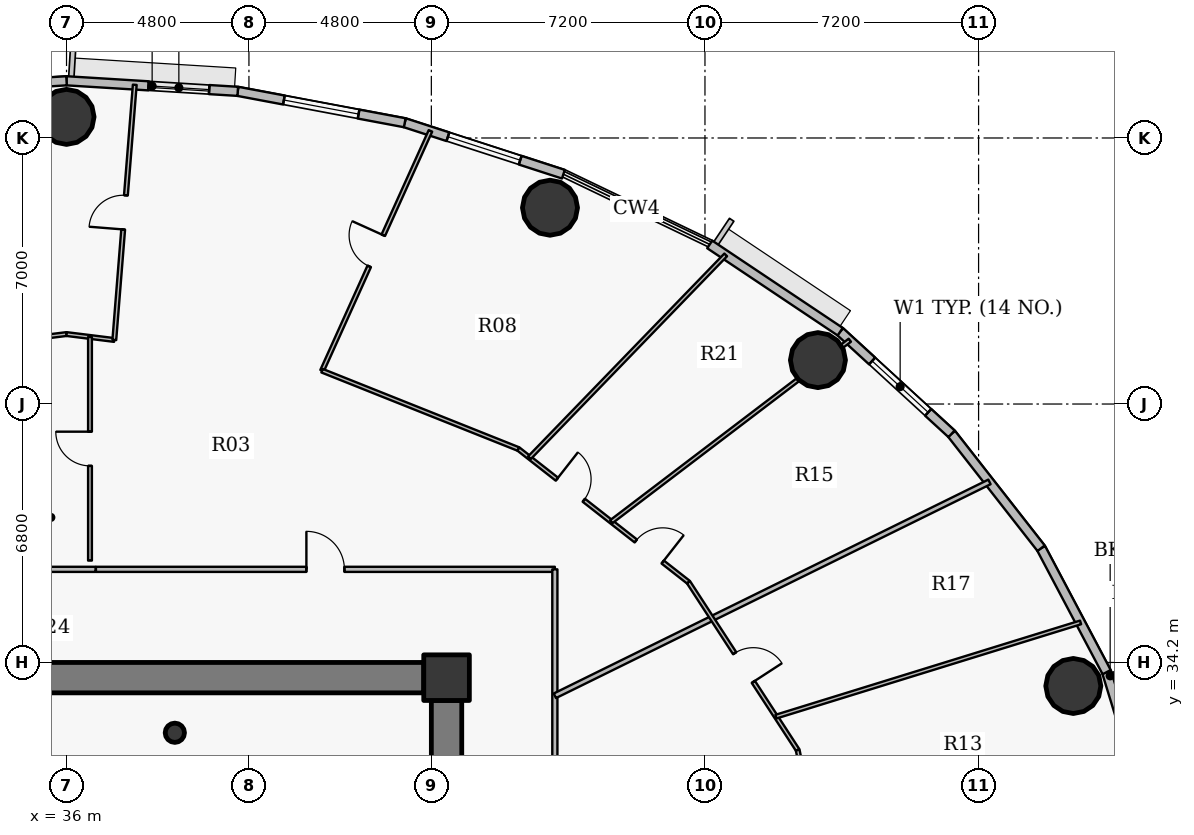
"""IFC4 building model, lengths in metres.
Left out: names, types, materials, properties, quantities, classifications, styles, units other than length and angle.
Written with IfcOpenShell. Run it as: python <this file> out.ifc"""

import sys

from ifc_helpers import new_model, si_unit, direction, frame, frame_2d, origin, origin_2d, place, context, subcontext, project, spatial, rectangle, hollow_circle, extrude, source, transform, mapped, element, fill, save


model = new_model("IFC4")
c1 = context("Model", 3, precision=1e-05, world=origin(), true_north=direction((0.0, 1.0)))
c2 = subcontext(c1, "Body", "Model", "MODEL_VIEW")
j1 = project(units=[si_unit("LENGTHUNIT", "METRE"), si_unit("PLANEANGLEUNIT", "RADIAN")], contexts=[c1])
p1 = place(None, origin())
s1 = spatial("IfcSite", under=j1, at=p1, CompositionType="ELEMENT")
p2 = place(p1, origin())
s2 = spatial("IfcBuilding", under=s1, at=p2, CompositionType="ELEMENT")
p3 = place(p2, frame((0.0, 0.0, 138.45)))
s3 = spatial("IfcBuildingStorey", under=s2, at=p3, CompositionType="ELEMENT", Elevation=138.45)
p4 = place(p3, frame((46.0, 33.8, 0.0), z_axis=(0.0, 0.0, 1.0), x_axis=(1.0, 0.0, 0.0)))
e1 = element("IfcColumn", 1, at=p4, inside=s3, PredefinedType="COLUMN", context=c2, shape_type="SweptSolid", body=[
    extrude(rectangle(XDim=1.2, YDim=1.2, at=origin_2d()), origin(), (0.0, 0.0, 1.0), 3.75),
])
p5 = place(p3, frame((38.85, 32.35, 0.0), z_axis=(0.0, 0.0, 1.0), x_axis=(1.0, 0.0, 0.0)))
e2 = element("IfcColumn", 2, at=p5, inside=s3, PredefinedType="COLUMN", context=c2, shape_type="SweptSolid", body=[
    extrude(hollow_circle(Radius=0.254, WallThickness=0.02, at=origin_2d()), origin(), (0.0, 0.0, 1.0), 3.75),
])
p6 = place(p3, frame((26.6, 33.8, 0.0), z_axis=(0.0, 0.0, 1.0), x_axis=(1.0, 0.0, 0.0)))
e3 = element("IfcWall", 3, at=p6, inside=s3, PredefinedType="SHEAR", context=c2, shape_type="SweptSolid", body=[
    extrude(rectangle(XDim=18.8, YDim=0.8, at=frame_2d((9.4, 0.0))), origin(), (0.0, 0.0, 1.0), 2.95),
])
p7 = place(p3, frame((46.0, 33.2, 0.0), z_axis=(0.0, 0.0, 1.0), x_axis=(0.0, -1.0, 0.0)))
e4 = element("IfcWall", 4, at=p7, inside=s3, PredefinedType="SHEAR", context=c2, shape_type="SweptSolid", body=[
    extrude(rectangle(XDim=12.4, YDim=0.8, at=frame_2d((6.2, 0.0))), origin(), (0.0, 0.0, 1.0), 2.95),
])
p8 = place(p7, frame((5.79, 0.0, 0.0)))
e5 = element("IfcOpeningElement", 5, at=p8, cuts=e4, PredefinedType="OPENING", context=c2, shape_type="SweptSolid", body=[
    extrude(rectangle(XDim=0.82, YDim=2.1, at=origin_2d()), frame((0.41, 0.41, 1.05), z_axis=(0.0, -1.0, 0.0), x_axis=(1.0, 0.0, 0.0)), (0.0, 0.0, 1.0), 0.82),
])
for number, where, z_axis, x_axis in (
    (6, (62.493, 33.581, 0.0), (0.0, 0.0, 1.0), (1.0, 0.0, 0.0)),
    (7, (55.773, 42.156, 0.0), (0.0, 0.0, 1.0), (1.0, 0.0, 0.0)),
    (8, (48.722, 46.165, 0.0), (0.0, 0.0, 1.0), (1.0, 0.0, 0.0)),
    (9, (36.0, 48.555, 0.0), (0.0, 0.0, 1.0), (1.0, 0.0, 0.0)),
):
    element("IfcColumn", number, at=place(p3, frame(where, z_axis=z_axis, x_axis=x_axis)), inside=s3, PredefinedType="COLUMN", context=c2, shape_type="SweptSolid", body=[
        extrude(hollow_circle(Radius=0.725, WallThickness=0.042, at=origin_2d()), origin(), (0.0, 0.0, 1.0), 3.75),
    ])
p9 = place(p3, frame((63.37, 33.945, 0.0), z_axis=(0.0, 0.0, 1.0), x_axis=(0.293124431344, -0.956074300329, 0.0)))
e10 = element("IfcWall", 10, at=p9, inside=s3, PredefinedType="SOLIDWALL", context=c2, shape_type="SweptSolid", body=[
    extrude(rectangle(XDim=3.587, YDim=0.24, at=frame_2d((1.793, 0.0))), origin(), (0.0, 0.0, 1.0), 3.5),
])
p10 = place(p9, frame((1.169, 0.0, 0.9)))
e11 = element("IfcOpeningElement", 11, at=p10, cuts=e10, PredefinedType="OPENING", context=c2, shape_type="SweptSolid", body=[
    extrude(rectangle(XDim=1.25, YDim=1.65, at=origin_2d()), frame((0.625, 0.13, 0.825), z_axis=(0.0, -1.0, 0.0), x_axis=(1.0, 0.0, 0.0)), (0.0, 0.0, 1.0), 0.26),
])
p11 = place(p3, frame((61.645, 37.206, 0.0), z_axis=(0.0, 0.0, 1.0), x_axis=(0.467614004126, -0.883932770716, 0.0)))
e12 = element("IfcWall", 12, at=p11, inside=s3, PredefinedType="SOLIDWALL", context=c2, shape_type="SweptSolid", body=[
    extrude(rectangle(XDim=3.689, YDim=0.24, at=frame_2d((1.844, 0.0))), origin(), (0.0, 0.0, 1.0), 3.5),
])
p12 = place(p3, frame((59.289, 40.217, 0.0), z_axis=(0.0, 0.0, 1.0), x_axis=(0.616272103517, -0.787533297345, 0.0)))
e13 = element("IfcWall", 13, at=p12, inside=s3, PredefinedType="SOLIDWALL", context=c2, shape_type="SweptSolid", body=[
    extrude(rectangle(XDim=3.823, YDim=0.24, at=frame_2d((1.912, 0.0))), origin(), (0.0, 0.0, 1.0), 3.5),
])
p13 = place(p3, frame((56.358, 42.903, 0.0), z_axis=(0.0, 0.0, 1.0), x_axis=(0.737113356241, -0.675769117414, 0.0)))
e14 = element("IfcWall", 14, at=p13, inside=s3, PredefinedType="SOLIDWALL", context=c2, shape_type="SweptSolid", body=[
    extrude(rectangle(XDim=3.976, YDim=0.24, at=frame_2d((1.988, 0.0))), origin(), (0.0, 0.0, 1.0), 3.5),
])
p14 = place(p13, frame((1.141, 0.0, 0.9)))
e15 = element("IfcOpeningElement", 15, at=p14, cuts=e14, PredefinedType="OPENING", context=c2, shape_type="SweptSolid", body=[
    extrude(rectangle(XDim=2.0, YDim=1.75, at=origin_2d()), frame((1.0, 0.13, 0.875), z_axis=(0.0, -1.0, 0.0), x_axis=(1.0, 0.0, 0.0)), (0.0, 0.0, 1.0), 0.26),
])
p15 = place(p3, frame((52.925, 45.199, 0.0), z_axis=(0.0, 0.0, 1.0), x_axis=(0.831221811447, -0.555940914284, 0.0)))
e16 = element("IfcWall", 16, at=p15, inside=s3, PredefinedType="SOLIDWALL", context=c2, shape_type="SweptSolid", body=[
    extrude(rectangle(XDim=4.13, YDim=0.24, at=frame_2d((2.065, 0.0))), origin(), (0.0, 0.0, 1.0), 3.5),
])
p16 = place(p3, frame((44.9, 48.401, 0.0), z_axis=(0.0, 0.0, 1.0), x_axis=(0.951211346073, -0.308540070495, 0.0)))
e17 = element("IfcWall", 17, at=p16, inside=s3, PredefinedType="SOLIDWALL", context=c2, shape_type="SweptSolid", body=[
    extrude(rectangle(XDim=4.388, YDim=0.24, at=frame_2d((2.194, 0.0))), origin(), (0.0, 0.0, 1.0), 3.5),
])
p17 = place(p16, frame((1.194, 0.0, 0.9)))
e18 = element("IfcOpeningElement", 18, at=p17, cuts=e17, PredefinedType="OPENING", context=c2, shape_type="SweptSolid", body=[
    extrude(rectangle(XDim=2.0, YDim=1.75, at=origin_2d()), frame((1.0, 0.13, 0.875), z_axis=(0.0, -1.0, 0.0), x_axis=(1.0, 0.0, 0.0)), (0.0, 0.0, 1.0), 0.26),
])
p18 = place(p3, frame((40.506, 49.227, 0.0), z_axis=(0.0, 0.0, 1.0), x_axis=(0.982789252177, -0.184730305596, 0.0)))
e19 = element("IfcWall", 19, at=p18, inside=s3, PredefinedType="SOLIDWALL", context=c2, shape_type="SweptSolid", body=[
    extrude(rectangle(XDim=4.471, YDim=0.24, at=frame_2d((2.235, 0.0))), origin(), (0.0, 0.0, 1.0), 3.5),
])
p19 = place(p18, frame((1.236, 0.0, 0.9)))
e20 = element("IfcOpeningElement", 20, at=p19, cuts=e19, PredefinedType="OPENING", context=c2, shape_type="SweptSolid", body=[
    extrude(rectangle(XDim=2.0, YDim=1.75, at=origin_2d()), frame((1.0, 0.13, 0.875), z_axis=(0.0, -1.0, 0.0), x_axis=(1.0, 0.0, 0.0)), (0.0, 0.0, 1.0), 0.26),
])
p20 = place(p3, frame((36.0, 49.505, 0.0), z_axis=(0.0, 0.0, 1.0), x_axis=(0.998107531589, -0.061492726276, 0.0)))
e21 = element("IfcWall", 21, at=p20, inside=s3, PredefinedType="SOLIDWALL", context=c2, shape_type="SweptSolid", body=[
    extrude(rectangle(XDim=4.514, YDim=0.24, at=frame_2d((2.257, 0.0))), origin(), (0.0, 0.0, 1.0), 3.5),
])
p21 = place(p20, frame((2.161, 0.0, 0.9)))
e22 = element("IfcOpeningElement", 22, at=p21, cuts=e21, PredefinedType="OPENING", context=c2, shape_type="SweptSolid", body=[
    extrude(rectangle(XDim=1.6, YDim=1.75, at=origin_2d()), frame((0.8, 0.13, 0.875), z_axis=(0.0, -1.0, 0.0), x_axis=(1.0, 0.0, 0.0)), (0.0, 0.0, 1.0), 0.26),
])
p22 = place(p3, frame((31.494, 49.227, 0.0), z_axis=(0.0, 0.0, 1.0), x_axis=(0.998107531589, 0.061492726276, 0.0)))
e23 = element("IfcWall", 23, at=p22, inside=s3, PredefinedType="SOLIDWALL", context=c2, shape_type="SweptSolid", body=[
    extrude(rectangle(XDim=4.514, YDim=0.24, at=frame_2d((2.257, 0.0))), origin(), (0.0, 0.0, 1.0), 3.5),
])
p23 = place(p22, frame((1.257, 0.0, 0.9)))
e24 = element("IfcOpeningElement", 24, at=p23, cuts=e23, PredefinedType="OPENING", context=c2, shape_type="SweptSolid", body=[
    extrude(rectangle(XDim=2.0, YDim=1.75, at=origin_2d()), frame((1.0, 0.13, 0.875), z_axis=(0.0, -1.0, 0.0), x_axis=(1.0, 0.0, 0.0)), (0.0, 0.0, 1.0), 0.26),
])
p24 = place(p3, frame((29.749, 42.066, 0.0), z_axis=(0.0, 0.0, 1.0), x_axis=(0.992395485088, 0.123090215599, 0.0)))
e25 = element("IfcWall", 25, at=p24, inside=s3, PredefinedType="PARTITIONING", context=c2, shape_type="SweptSolid", body=[
    extrude(rectangle(XDim=6.299, YDim=0.1, at=frame_2d((3.15, 0.0))), origin(), (0.0, 0.0, 1.0), 2.935),
])
p25 = place(p3, frame((36.0, 42.841, 0.0), z_axis=(0.0, 0.0, 1.0), x_axis=(0.992384274499, -0.123180565541, 0.0)))
e26 = element("IfcWall", 26, at=p25, inside=s3, PredefinedType="PARTITIONING", context=c2, shape_type="SweptSolid", body=[
    extrude(rectangle(XDim=1.267, YDim=0.1, at=frame_2d((0.633, 0.0))), origin(), (0.0, 0.0, 1.0), 2.935),
])
p26 = place(p3, frame((36.617, 36.881, 0.0), z_axis=(0.0, 0.0, 1.0), x_axis=(0.0, 1.0, 0.0)))
e27 = element("IfcWall", 27, at=p26, inside=s3, PredefinedType="PARTITIONING", context=c2, shape_type="SweptSolid", body=[
    extrude(rectangle(XDim=5.884, YDim=0.1, at=frame_2d((2.942, 0.0))), origin(), (0.0, 0.0, 1.0), 3.5),
])
p27 = place(p26, frame((2.492, 0.0, 0.0)))
e28 = element("IfcOpeningElement", 28, at=p27, cuts=e27, PredefinedType="OPENING", context=c2, shape_type="SweptSolid", body=[
    extrude(rectangle(XDim=0.9, YDim=2.1, at=origin_2d()), frame((0.45, 0.06, 1.05), z_axis=(0.0, -1.0, 0.0), x_axis=(1.0, 0.0, 0.0)), (0.0, 0.0, 1.0), 0.12),
])
p28 = place(p3, frame((36.774, 36.65, 0.0), z_axis=(0.0, 0.0, 1.0), x_axis=(1.0, 0.0, 0.0)))
e29 = element("IfcWall", 29, at=p28, inside=s3, PredefinedType="PARTITIONING", context=c2, shape_type="SweptSolid", body=[
    extrude(rectangle(XDim=12.076, YDim=0.135, at=frame_2d((6.038, 0.0))), origin(), (0.0, 0.0, 1.0), 2.935),
])
p29 = place(p28, frame((5.538, 0.0, 0.0)))
e30 = element("IfcOpeningElement", 30, at=p29, cuts=e29, PredefinedType="OPENING", context=c2, shape_type="SweptSolid", body=[
    extrude(rectangle(XDim=1.0, YDim=2.15, at=origin_2d()), frame((0.5, 0.078, 1.075), z_axis=(0.0, -1.0, 0.0), x_axis=(1.0, 0.0, 0.0)), (0.0, 0.0, 1.0), 0.155),
])
p30 = place(p3, frame((37.258, 42.685, 0.0), z_axis=(0.0, 0.0, 1.0), x_axis=(0.079919529762, 0.9968013186, 0.0)))
e31 = element("IfcWall", 31, at=p30, inside=s3, PredefinedType="PARTITIONING", context=c2, shape_type="SweptSolid", body=[
    extrude(rectangle(XDim=6.736, YDim=0.1, at=frame_2d((3.368, 0.0))), origin(), (0.0, 0.0, 1.0), 2.935),
])
p31 = place(p30, frame((2.918, 0.0, 0.0)))
e32 = element("IfcOpeningElement", 32, at=p31, cuts=e31, PredefinedType="OPENING", context=c2, shape_type="SweptSolid", body=[
    extrude(rectangle(XDim=0.9, YDim=2.1, at=origin_2d()), frame((0.45, 0.06, 1.05), z_axis=(0.0, -1.0, 0.0), x_axis=(1.0, 0.0, 0.0)), (0.0, 0.0, 1.0), 0.12),
])
p32 = place(p3, frame((42.724, 41.877, 0.0), z_axis=(0.0, 0.0, 1.0), x_axis=(0.411868207503, 0.911243425023, 0.0)))
e33 = element("IfcWall", 33, at=p32, inside=s3, PredefinedType="PARTITIONING", context=c2, shape_type="SweptSolid", body=[
    extrude(rectangle(XDim=6.925, YDim=0.1, at=frame_2d((3.462, 0.0))), origin(), (0.0, 0.0, 1.0), 2.935),
])
p33 = place(p32, frame((3.012, 0.0, 0.0)))
e34 = element("IfcOpeningElement", 34, at=p33, cuts=e33, PredefinedType="OPENING", context=c2, shape_type="SweptSolid", body=[
    extrude(rectangle(XDim=0.9, YDim=2.1, at=origin_2d()), frame((0.45, 0.06, 1.05), z_axis=(0.0, -1.0, 0.0), x_axis=(1.0, 0.0, 0.0)), (0.0, 0.0, 1.0), 0.12),
])
p34 = place(p3, frame((42.724, 41.877, 0.0), z_axis=(0.0, 0.0, 1.0), x_axis=(0.928806258388, -0.370565695093, 0.0)))
e35 = element("IfcWall", 35, at=p34, inside=s3, PredefinedType="PARTITIONING", context=c2, shape_type="SweptSolid", body=[
    extrude(rectangle(XDim=5.562, YDim=0.1, at=frame_2d((2.781, 0.0))), origin(), (0.0, 0.0, 1.0), 2.935),
])
p35 = place(p3, frame((47.891, 39.816, 0.0), z_axis=(0.0, 0.0, 1.0), x_axis=(0.787347250317, -0.61650977885, 0.0)))
e36 = element("IfcWall", 36, at=p35, inside=s3, PredefinedType="PARTITIONING", context=c2, shape_type="SweptSolid", body=[
    extrude(rectangle(XDim=5.683, YDim=0.1, at=frame_2d((2.842, 0.0))), origin(), (0.0, 0.0, 1.0), 2.935),
])
p36 = place(p35, frame((3.923, 0.0, 0.0)))
e37 = element("IfcOpeningElement", 37, at=p36, cuts=e36, PredefinedType="OPENING", context=c2, shape_type="SweptSolid", body=[
    extrude(rectangle(XDim=0.9, YDim=2.1, at=origin_2d()), frame((0.45, 0.06, 1.05), z_axis=(0.0, -1.0, 0.0), x_axis=(1.0, 0.0, 0.0)), (0.0, 0.0, 1.0), 0.12),
])
p37 = place(p35, frame((1.286, 0.0, 0.0)))
e38 = element("IfcOpeningElement", 38, at=p37, cuts=e36, PredefinedType="OPENING", context=c2, shape_type="SweptSolid", body=[
    extrude(rectangle(XDim=0.9, YDim=2.1, at=origin_2d()), frame((0.45, 0.06, 1.05), z_axis=(0.0, -1.0, 0.0), x_axis=(1.0, 0.0, 0.0)), (0.0, 0.0, 1.0), 0.12),
])
p38 = place(p3, frame((48.182, 39.588, 0.0), z_axis=(0.0, 0.0, 1.0), x_axis=(0.695422522839, 0.718601081775, 0.0)))
e39 = element("IfcWall", 39, at=p38, inside=s3, PredefinedType="PARTITIONING", context=c2, shape_type="SweptSolid", body=[
    extrude(rectangle(XDim=7.426, YDim=0.1, at=frame_2d((3.713, 0.0))), origin(), (0.0, 0.0, 1.0), 2.935),
])
p39 = place(p3, frame((48.85, 17.35, 0.0), z_axis=(0.0, 0.0, 1.0), x_axis=(0.0, 1.0, 0.0)))
e40 = element("IfcWall", 40, at=p39, inside=s3, PredefinedType="PARTITIONING", context=c2, shape_type="SweptSolid", body=[
    extrude(rectangle(XDim=19.3, YDim=0.135, at=frame_2d((9.65, 0.0))), origin(), (0.0, 0.0, 1.0), 2.935),
])
p40 = place(p39, frame((7.609, 0.0, 0.0)))
e41 = element("IfcOpeningElement", 41, at=p40, cuts=e40, PredefinedType="OPENING", context=c2, shape_type="SweptSolid", body=[
    extrude(rectangle(XDim=1.0, YDim=2.15, at=origin_2d()), frame((0.5, 0.078, 1.075), z_axis=(0.0, -1.0, 0.0), x_axis=(1.0, 0.0, 0.0)), (0.0, 0.0, 1.0), 0.155),
])
p41 = place(p3, frame((48.85, 33.323, 0.0), z_axis=(0.0, 0.0, 1.0), x_axis=(0.897255437174, 0.44151181237, 0.0)))
e42 = element("IfcWall", 42, at=p41, inside=s3, PredefinedType="PARTITIONING", context=c2, shape_type="SweptSolid", body=[
    extrude(rectangle(XDim=12.746, YDim=0.135, at=frame_2d((6.373, 0.0))), origin(), (0.0, 0.0, 1.0), 2.935),
])
p42 = place(p3, frame((50.334, 37.903, 0.0), z_axis=(0.0, 0.0, 1.0), x_axis=(0.795918180565, 0.60540420369, 0.0)))
e43 = element("IfcWall", 43, at=p42, inside=s3, PredefinedType="PARTITIONING", context=c2, shape_type="SweptSolid", body=[
    extrude(rectangle(XDim=7.887, YDim=0.1, at=frame_2d((3.944, 0.0))), origin(), (0.0, 0.0, 1.0), 2.935),
])
p43 = place(p3, frame((52.366, 36.311, 0.0), z_axis=(0.0, 0.0, 1.0), x_axis=(0.545405249109, -0.838172484781, 0.0)))
e44 = element("IfcWall", 44, at=p43, inside=s3, PredefinedType="PARTITIONING", context=c2, shape_type="SweptSolid", body=[
    extrude(rectangle(XDim=5.269, YDim=0.1, at=frame_2d((2.634, 0.0))), origin(), (0.0, 0.0, 1.0), 2.935),
])
p44 = place(p43, frame((2.228, 0.0, 0.0)))
e45 = element("IfcOpeningElement", 45, at=p44, cuts=e44, PredefinedType="OPENING", context=c2, shape_type="SweptSolid", body=[
    extrude(rectangle(XDim=0.9, YDim=2.1, at=origin_2d()), frame((0.45, 0.06, 1.05), z_axis=(0.0, -1.0, 0.0), x_axis=(1.0, 0.0, 0.0)), (0.0, 0.0, 1.0), 0.12),
])
p45 = place(p3, frame((54.668, 32.774, 0.0), z_axis=(0.0, 0.0, 1.0), x_axis=(0.955345753083, 0.295490257144, 0.0)))
e46 = element("IfcWall", 46, at=p45, inside=s3, PredefinedType="PARTITIONING", context=c2, shape_type="SweptSolid", body=[
    extrude(rectangle(XDim=8.39, YDim=0.1, at=frame_2d((4.195, 0.0))), origin(), (0.0, 0.0, 1.0), 2.935),
])
p46 = place(p3, frame((55.24, 31.895, 0.0), z_axis=(0.0, 0.0, 1.0), x_axis=(0.198189059207, -0.980163811213, 0.0)))
e47 = element("IfcWall", 47, at=p46, inside=s3, PredefinedType="PARTITIONING", context=c2, shape_type="SweptSolid", body=[
    extrude(rectangle(XDim=3.08, YDim=0.1, at=frame_2d((1.54, 0.0))), origin(), (0.0, 0.0, 1.0), 2.935),
])
p47 = place(p3, frame((33.396, 36.65, 0.0), z_axis=(0.0, 0.0, 1.0), x_axis=(1.0, 0.0, 0.0)))
e48 = element("IfcWall", 48, at=p47, inside=s3, PredefinedType="PARTITIONING", context=c2, shape_type="SweptSolid", body=[
    extrude(rectangle(XDim=3.367, YDim=0.135, at=frame_2d((1.684, 0.0))), origin(), (0.0, 0.0, 1.0), 2.935),
])
p48 = place(p3, frame((46.4, 34.2, 0.0), z_axis=(0.0, 0.0, 1.0), x_axis=(-1.0, 0.0, 0.0)))
e49 = element("IfcWall", 49, at=p48, inside=s3, PredefinedType="PARTITIONING", context=c2, shape_type="SweptSolid", body=[
    extrude(rectangle(XDim=0.99, YDim=0.135, at=frame_2d((0.495, 0.0))), origin(), (0.0, 0.0, 1.0), 2.935),
])
p49 = place(p3, frame((46.4, 33.21, 0.0), z_axis=(0.0, 0.0, 1.0), x_axis=(0.0, 1.0, 0.0)))
e50 = element("IfcWall", 50, at=p49, inside=s3, PredefinedType="PARTITIONING", context=c2, shape_type="SweptSolid", body=[
    extrude(rectangle(XDim=0.683, YDim=0.135, at=frame_2d((0.341, 0.0))), origin(), (0.0, 0.0, 1.0), 3.5),
])
m1 = source(origin(), c2, "Body", "SweptSolid", [
    extrude(rectangle(XDim=2.0, YDim=1.75, at=origin_2d()), frame((1.0, 0.03, 0.875), z_axis=(0.0, -1.0, 0.0), x_axis=(1.0, 0.0, 0.0)), (0.0, 0.0, 1.0), 0.06),
])
p50 = place(p14, origin())
e51 = element("IfcWindow", 51, at=p50, inside=s3, PartitioningType="DOUBLE_PANEL_VERTICAL", PredefinedType="WINDOW", context=c2, shape_type="MappedRepresentation", body=[
    mapped(m1, transform((0.0, 0.0, 0.0), x_axis=(1.0, 0.0, 0.0), y_axis=(0.0, 1.0, 0.0), z_axis=(0.0, 0.0, 1.0), scale=1.0)),
])
fill(e15, e51)
p51 = place(p17, origin())
e52 = element("IfcWindow", 52, at=p51, inside=s3, PartitioningType="DOUBLE_PANEL_VERTICAL", PredefinedType="WINDOW", context=c2, shape_type="MappedRepresentation", body=[
    mapped(m1, transform((0.0, 0.0, 0.0), x_axis=(1.0, 0.0, 0.0), y_axis=(0.0, 1.0, 0.0), z_axis=(0.0, 0.0, 1.0), scale=1.0)),
])
fill(e18, e52)
p52 = place(p19, origin())
e53 = element("IfcWindow", 53, at=p52, inside=s3, PartitioningType="DOUBLE_PANEL_VERTICAL", PredefinedType="WINDOW", context=c2, shape_type="MappedRepresentation", body=[
    mapped(m1, transform((0.0, 0.0, 0.0), x_axis=(1.0, 0.0, 0.0), y_axis=(0.0, 1.0, 0.0), z_axis=(0.0, 0.0, 1.0), scale=1.0)),
])
fill(e20, e53)
m2 = source(origin(), c2, "Body", "SweptSolid", [
    extrude(rectangle(XDim=1.6, YDim=1.75, at=origin_2d()), frame((0.8, 0.03, 0.875), z_axis=(0.0, -1.0, 0.0), x_axis=(1.0, 0.0, 0.0)), (0.0, 0.0, 1.0), 0.06),
])
p53 = place(p21, origin())
e54 = element("IfcWindow", 54, at=p53, inside=s3, PartitioningType="DOUBLE_PANEL_VERTICAL", PredefinedType="WINDOW", context=c2, shape_type="MappedRepresentation", body=[
    mapped(m2, transform((0.0, 0.0, 0.0), x_axis=(1.0, 0.0, 0.0), y_axis=(0.0, 1.0, 0.0), z_axis=(0.0, 0.0, 1.0), scale=1.0)),
])
fill(e22, e54)
m3 = source(origin(), c2, "Body", "SweptSolid", [
    extrude(rectangle(XDim=0.9, YDim=2.1, at=origin_2d()), frame((0.45, 0.025, 1.05), z_axis=(0.0, -1.0, 0.0), x_axis=(1.0, 0.0, 0.0)), (0.0, 0.0, 1.0), 0.05),
])
p54 = place(p44, origin())
e55 = element("IfcDoor", 55, at=p54, inside=s3, OperationType="SINGLE_SWING_RIGHT", PredefinedType="DOOR", context=c2, shape_type="MappedRepresentation", body=[
    mapped(m3, transform((0.0, 0.0, 0.0), x_axis=(1.0, 0.0, 0.0), y_axis=(0.0, 1.0, 0.0), z_axis=(0.0, 0.0, 1.0), scale=1.0)),
])
fill(e45, e55)
m4 = source(origin(), c2, "Body", "SweptSolid", [
    extrude(rectangle(XDim=1.0, YDim=2.15, at=origin_2d()), frame((0.5, 0.025, 1.075), z_axis=(0.0, -1.0, 0.0), x_axis=(1.0, 0.0, 0.0)), (0.0, 0.0, 1.0), 0.05),
])
p55 = place(p29, origin())
e56 = element("IfcDoor", 56, at=p55, inside=s3, OperationType="SINGLE_SWING_LEFT", PredefinedType="DOOR", context=c2, shape_type="MappedRepresentation", body=[
    mapped(m4, transform((0.0, 0.0, 0.0), x_axis=(1.0, 0.0, 0.0), y_axis=(0.0, 1.0, 0.0), z_axis=(0.0, 0.0, 1.0), scale=1.0)),
])
fill(e30, e56)
p56 = place(p36, origin())
e57 = element("IfcDoor", 57, at=p56, inside=s3, OperationType="SINGLE_SWING_RIGHT", PredefinedType="DOOR", context=c2, shape_type="MappedRepresentation", body=[
    mapped(m3, transform((0.0, 0.0, 0.0), x_axis=(1.0, 0.0, 0.0), y_axis=(0.0, 1.0, 0.0), z_axis=(0.0, 0.0, 1.0), scale=1.0)),
])
fill(e37, e57)
p57 = place(p37, origin())
e58 = element("IfcDoor", 58, at=p57, inside=s3, OperationType="SINGLE_SWING_LEFT", PredefinedType="DOOR", context=c2, shape_type="MappedRepresentation", body=[
    mapped(m3, transform((0.0, 0.0, 0.0), x_axis=(1.0, 0.0, 0.0), y_axis=(0.0, 1.0, 0.0), z_axis=(0.0, 0.0, 1.0), scale=1.0)),
])
fill(e38, e58)
p58 = place(p33, origin())
e59 = element("IfcDoor", 59, at=p58, inside=s3, OperationType="SINGLE_SWING_RIGHT", PredefinedType="DOOR", context=c2, shape_type="MappedRepresentation", body=[
    mapped(m3, transform((0.0, 0.0, 0.0), x_axis=(1.0, 0.0, 0.0), y_axis=(0.0, 1.0, 0.0), z_axis=(0.0, 0.0, 1.0), scale=1.0)),
])
fill(e34, e59)
p59 = place(p31, origin())
e60 = element("IfcDoor", 60, at=p59, inside=s3, OperationType="SINGLE_SWING_LEFT", PredefinedType="DOOR", context=c2, shape_type="MappedRepresentation", body=[
    mapped(m3, transform((0.0, 0.0, 0.0), x_axis=(1.0, 0.0, 0.0), y_axis=(0.0, 1.0, 0.0), z_axis=(0.0, 0.0, 1.0), scale=1.0)),
])
fill(e32, e60)
p60 = place(p27, origin())
e61 = element("IfcDoor", 61, at=p60, inside=s3, OperationType="SINGLE_SWING_RIGHT", PredefinedType="DOOR", context=c2, shape_type="MappedRepresentation", body=[
    mapped(m3, transform((0.0, 0.0, 0.0), x_axis=(1.0, 0.0, 0.0), y_axis=(0.0, 1.0, 0.0), z_axis=(0.0, 0.0, 1.0), scale=1.0)),
])
fill(e28, e61)
save(model, sys.argv[1])
